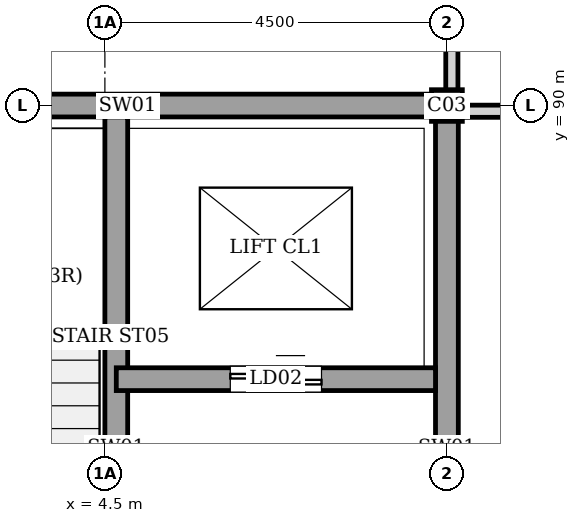
"""IFC4 building model, lengths in metres.
Left out: names, types, materials, properties, quantities, classifications, styles, units other than length and angle.
Written with IfcOpenShell. Run it as: python <this file> out.ifc"""

import sys

from ifc_helpers import new_model, si_unit, direction, frame, frame_2d, origin, origin_2d, place, context, subcontext, project, spatial, rectangle, i_section, extrude, element, fill, save


model = new_model("IFC4")
c1 = context("Model", 3, precision=1e-05, world=origin(), true_north=direction((0.0, 1.0)))
c2 = subcontext(c1, "Body", "Model", "MODEL_VIEW")
j1 = project(units=[si_unit("LENGTHUNIT", "METRE"), si_unit("PLANEANGLEUNIT", "RADIAN")], contexts=[c1])
p1 = place(None, origin())
s1 = spatial("IfcSite", under=j1, at=p1, CompositionType="ELEMENT")
p2 = place(p1, origin())
s2 = spatial("IfcBuilding", under=s1, at=p2, CompositionType="ELEMENT")
p3 = place(p2, origin())
s3 = spatial("IfcBuildingStorey", under=s2, at=p3, CompositionType="ELEMENT", Elevation=0.0)
p4 = place(p3, frame((9.0, 90.0, 0.0), z_axis=(0.0, 0.0, 1.0), x_axis=(1.0, 0.0, 0.0)))
e1 = element("IfcColumn", 1, at=p4, inside=s3, PredefinedType="COLUMN", context=c2, shape_type="SweptSolid", body=[
    extrude(i_section(OverallWidth=0.406, OverallDepth=0.416, WebThickness=0.022, FlangeThickness=0.038, at=origin_2d()), origin(), (0.0, 0.0, 1.0), 4.32),
])
p5 = place(p3, frame((9.0, 81.0, 0.0), z_axis=(0.0, 0.0, 1.0), x_axis=(0.0, 1.0, 0.0)))
e2 = element("IfcWall", 2, at=p5, inside=s3, PredefinedType="SHEAR", context=c2, shape_type="SweptSolid", body=[
    extrude(rectangle(XDim=9.0, YDim=0.3, at=frame_2d((4.5, 0.0))), origin(), (0.0, 0.0, 1.0), 4.055),
])
p6 = place(p5, frame((2.05, 0.0, 0.0)))
e3 = element("IfcOpeningElement", 3, at=p6, cuts=e2, PredefinedType="OPENING", context=c2, shape_type="SweptSolid", body=[
    extrude(rectangle(XDim=1.4, YDim=2.02, at=frame_2d((0.7, 1.01))), frame((0.0, 0.16, 0.0), z_axis=(0.0, -1.0, 0.0), x_axis=(1.0, 0.0, 0.0)), (0.0, 0.0, 1.0), 0.32),
])
p7 = place(p3, frame((0.0, 90.0, 0.0), z_axis=(0.0, 0.0, 1.0), x_axis=(1.0, 0.0, 0.0)))
e4 = element("IfcWall", 4, at=p7, inside=s3, PredefinedType="SHEAR", context=c2, shape_type="SweptSolid", body=[
    extrude(rectangle(XDim=9.0, YDim=0.3, at=frame_2d((4.5, 0.0))), origin(), (0.0, 0.0, 1.0), 4.055),
])
p8 = place(p3, frame((4.65, 81.15, 0.0), z_axis=(0.0, 0.0, 1.0), x_axis=(0.0, 1.0, 0.0)))
e5 = element("IfcWall", 5, at=p8, inside=s3, PredefinedType="SHEAR", context=c2, shape_type="SweptSolid", body=[
    extrude(rectangle(XDim=8.7, YDim=0.3, at=frame_2d((4.35, 0.0))), origin(), (0.0, 0.0, 1.0), 4.055),
])
p9 = place(p8, frame((0.35, 0.0, 0.0)))
e6 = element("IfcOpeningElement", 6, at=p9, cuts=e5, PredefinedType="OPENING", context=c2, shape_type="SweptSolid", body=[
    extrude(rectangle(XDim=1.4, YDim=2.02, at=frame_2d((0.7, 1.01))), frame((0.0, 0.16, 0.0), z_axis=(0.0, -1.0, 0.0), x_axis=(1.0, 0.0, 0.0)), (0.0, 0.0, 1.0), 0.32),
])
p10 = place(p3, frame((4.65, 86.4, 0.0), z_axis=(0.0, 0.0, 1.0), x_axis=(1.0, 0.0, 0.0)))
e7 = element("IfcWall", 7, at=p10, inside=s3, PredefinedType="SHEAR", context=c2, shape_type="SweptSolid", body=[
    extrude(rectangle(XDim=4.2, YDim=0.3, at=frame_2d((2.1, 0.0))), origin(), (0.0, 0.0, 1.0), 4.055),
])
p11 = place(p10, frame((1.5, 0.0, 0.0)))
e8 = element("IfcOpeningElement", 8, at=p11, cuts=e7, PredefinedType="OPENING", context=c2, shape_type="SweptSolid", body=[
    extrude(rectangle(XDim=1.2, YDim=2.2, at=frame_2d((0.6, 1.1))), frame((0.0, 0.16, 0.0), z_axis=(0.0, -1.0, 0.0), x_axis=(1.0, 0.0, 0.0)), (0.0, 0.0, 1.0), 0.32),
])
p12 = place(p3, frame((9.155, 89.925, 0.0), z_axis=(0.0, 0.0, 1.0), x_axis=(1.0, 0.0, 0.0)))
e9 = element("IfcWall", 9, at=p12, inside=s3, PredefinedType="PARTITIONING", context=c2, shape_type="SweptSolid", body=[
    extrude(rectangle(XDim=2.625, YDim=0.16, at=frame_2d((1.312, 0.0))), origin(), (0.0, 0.0, 1.0), 3.655),
])
p13 = place(p12, frame((0.562, 0.0, 0.0)))
e10 = element("IfcOpeningElement", 10, at=p13, cuts=e9, PredefinedType="OPENING", context=c2, shape_type="SweptSolid", body=[
    extrude(rectangle(XDim=1.5, YDim=2.1, at=frame_2d((0.75, 1.05))), frame((0.0, 0.09, 0.0), z_axis=(0.0, -1.0, 0.0), x_axis=(1.0, 0.0, 0.0)), (0.0, 0.0, 1.0), 0.18),
])
p14 = place(p3, frame((9.065, 90.08, 0.0), z_axis=(0.0, 0.0, 1.0), x_axis=(0.0, 1.0, 0.0)))
e11 = element("IfcWall", 11, at=p14, inside=s3, PredefinedType="PARTITIONING", context=c2, shape_type="SweptSolid", body=[
    extrude(rectangle(XDim=8.94, YDim=0.16, at=frame_2d((4.47, 0.0))), origin(), (0.0, 0.0, 1.0), 3.365),
])
p15 = place(p11, origin())
e12 = element("IfcDoor", 12, at=p15, inside=s3, OperationType="DOUBLE_DOOR_SLIDING", PredefinedType="DOOR", context=c2, shape_type="SweptSolid", body=[
    extrude(rectangle(XDim=1.2, YDim=2.2, at=frame_2d((0.6, 1.1))), frame((0.0, 0.025, 0.0), z_axis=(0.0, -1.0, 0.0), x_axis=(1.0, 0.0, 0.0)), (0.0, 0.0, 1.0), 0.05),
])
fill(e8, e12)
save(model, sys.argv[1])
